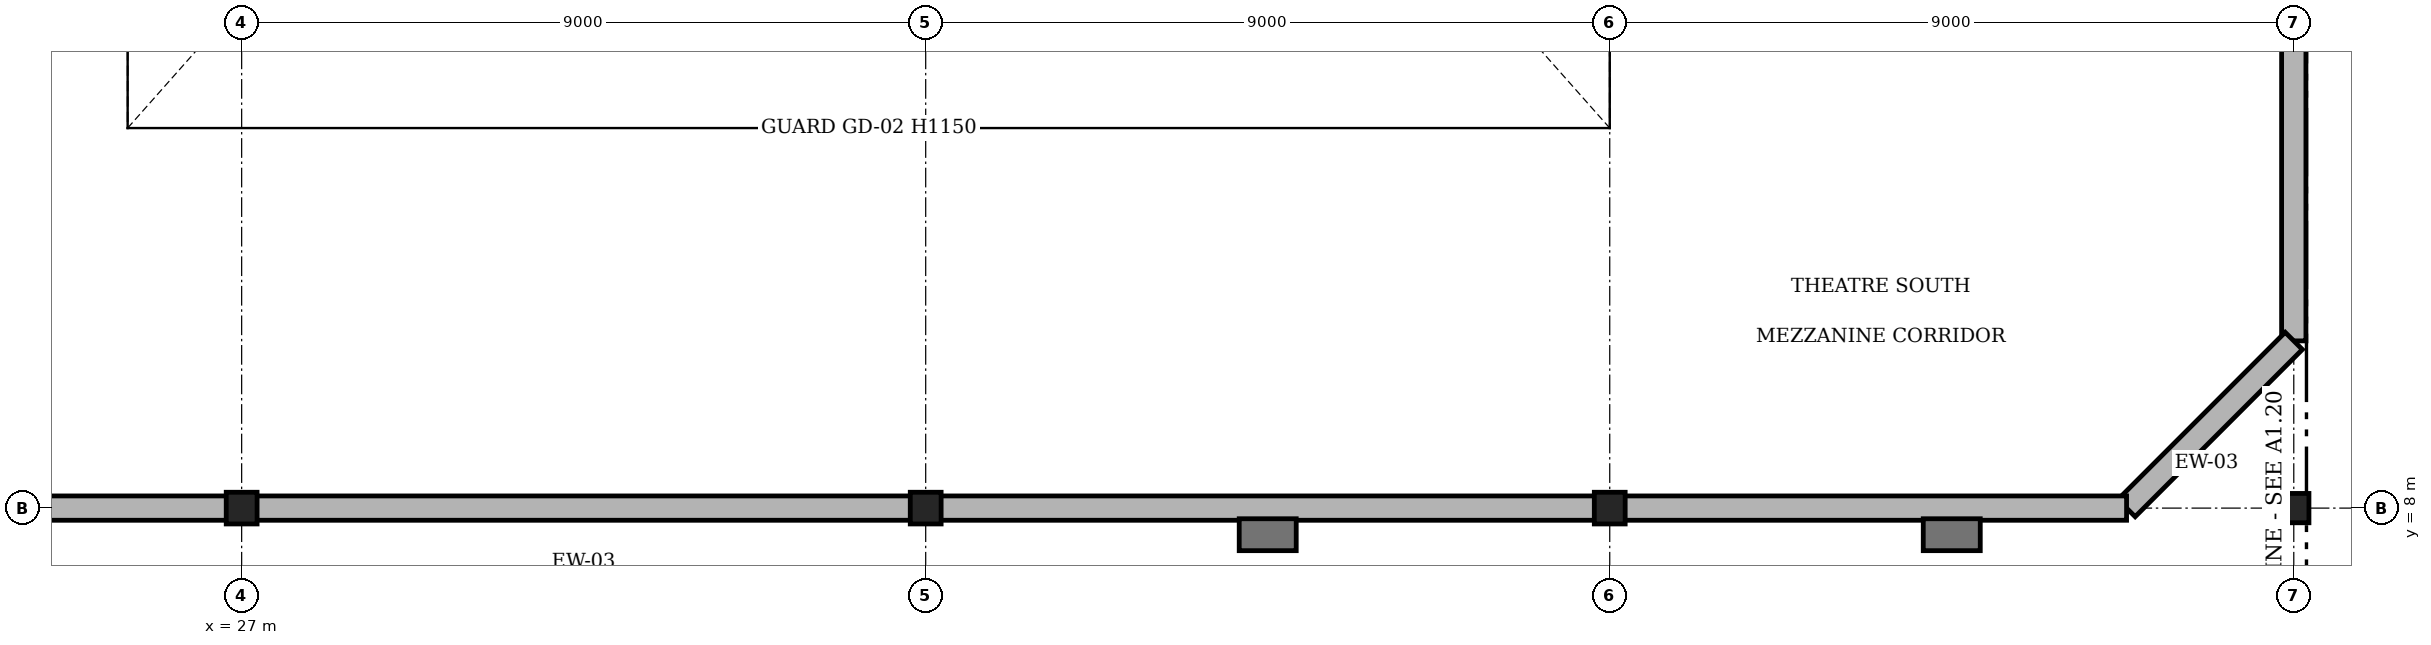
"""IFC4 building model, lengths in metres.
Left out: names, types, materials, properties, quantities, classifications, styles, units other than length and angle.
Written with IfcOpenShell. Run it as: python <this file> out.ifc"""

import sys

from ifc_helpers import new_model, si_unit, direction, frame, frame_2d, origin, origin_2d, place, context, subcontext, project, spatial, rectangle, i_section, extrude, element, save


model = new_model("IFC4")
c1 = context("Model", 3, precision=1e-05, world=origin(), true_north=direction((0.0, 1.0)))
c2 = subcontext(c1, "Body", "Model", "MODEL_VIEW")
j1 = project(units=[si_unit("LENGTHUNIT", "METRE"), si_unit("PLANEANGLEUNIT", "RADIAN")], contexts=[c1])
p1 = place(None, origin())
s1 = spatial("IfcSite", under=j1, at=p1, CompositionType="ELEMENT")
p2 = place(p1, origin())
s2 = spatial("IfcBuilding", under=s1, at=p2, CompositionType="ELEMENT")
p3 = place(p2, frame((0.0, 0.0, 5.4)))
s3 = spatial("IfcBuildingStorey", under=s2, at=p3, CompositionType="ELEMENT", Elevation=5.4)
for number, where, z_axis, x_axis in (
    (1, (27.0, 8.0, 0.0), (0.0, 0.0, 1.0), (1.0, 0.0, 0.0)),
    (2, (36.0, 8.0, 0.0), (0.0, 0.0, 1.0), (1.0, 0.0, 0.0)),
    (3, (45.0, 8.0, 0.0), (0.0, 0.0, 1.0), (1.0, 0.0, 0.0)),
):
    element("IfcColumn", number, at=place(p3, frame(where, z_axis=z_axis, x_axis=x_axis)), inside=s3, PredefinedType="COLUMN", context=c2, shape_type="SweptSolid", body=[
        extrude(i_section(OverallWidth=0.406, OverallDepth=0.417, WebThickness=0.03, FlangeThickness=0.044, FilletRadius=0.015, at=origin_2d()), origin(), (0.0, 0.0, 1.0), 5.4),
    ])
p4 = place(p3, frame((54.0, 8.0, 0.0), z_axis=(0.0, 0.0, 1.0), x_axis=(1.0, 0.0, 0.0)))
e4 = element("IfcColumn", 4, at=p4, inside=s3, PredefinedType="COLUMN", context=c2, shape_type="SweptSolid", body=[
    extrude(i_section(OverallWidth=0.399, OverallDepth=0.386, WebThickness=0.021, FlangeThickness=0.033, FilletRadius=0.015, at=origin_2d()), origin(), (0.0, 0.0, 1.0), 5.4),
])
for number, where, z_axis, x_axis in (
    (5, (40.5, 7.65, 0.0), (0.0, 0.0, 1.0), (1.0, 0.0, 0.0)),
    (6, (49.5, 7.65, 0.0), (0.0, 0.0, 1.0), (1.0, 0.0, 0.0)),
):
    element("IfcColumn", number, at=place(p3, frame(where, z_axis=z_axis, x_axis=x_axis)), inside=s3, PredefinedType="PILASTER", context=c2, shape_type="SweptSolid", body=[
        extrude(rectangle(XDim=0.75, YDim=0.42, at=origin_2d()), origin(), (0.0, 0.0, 1.0), 5.4),
    ])
p5 = place(p3, frame((54.0, 21.94, 0.0), z_axis=(0.0, 0.0, 1.0), x_axis=(0.0, -1.0, 0.0)))
e7 = element("IfcWall", 7, at=p5, inside=s3, PredefinedType="SOLIDWALL", context=c2, shape_type="SweptSolid", body=[
    extrude(rectangle(XDim=11.74, YDim=0.32, at=frame_2d((5.87, 0.0))), origin(), (0.0, 0.0, 1.0), 4.72),
])
p6 = place(p3, frame((54.0, 10.2, 0.0), z_axis=(0.0, 0.0, 1.0), x_axis=(-0.707106781187, -0.707106781187, 0.0)))
e8 = element("IfcWall", 8, at=p6, inside=s3, PredefinedType="SOLIDWALL", context=c2, shape_type="SweptSolid", body=[
    extrude(rectangle(XDim=3.111, YDim=0.32, at=frame_2d((1.556, 0.0))), origin(), (0.0, 0.0, 1.0), 4.72),
])
p7 = place(p3, frame((51.8, 8.0, 0.0), z_axis=(0.0, 0.0, 1.0), x_axis=(-1.0, 0.0, 0.0)))
e9 = element("IfcWall", 9, at=p7, inside=s3, PredefinedType="SOLIDWALL", context=c2, shape_type="SweptSolid", body=[
    extrude(rectangle(XDim=40.6, YDim=0.32, at=frame_2d((20.3, 0.0))), origin(), (0.0, 0.0, 1.0), 4.193),
])
save(model, sys.argv[1])
